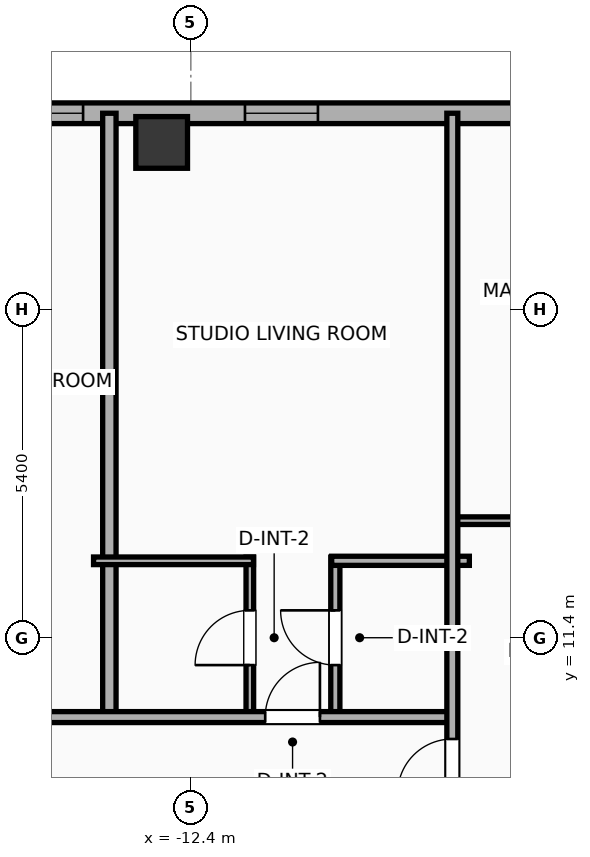
"""IFC4 building model, lengths in metres.
Left out: names, types, materials, properties, quantities, classifications, styles, units other than length and angle.
Written with IfcOpenShell. Run it as: python <this file> out.ifc"""

import sys

from ifc_helpers import new_model, si_unit, direction, frame, frame_2d, origin, origin_2d, place, context, subcontext, project, spatial, rectangle, hollow_rectangle, extrude, element, fill, save


model = new_model("IFC4")
c1 = context("Model", 3, precision=1e-05, world=origin(), true_north=direction((0.0, 1.0)))
c2 = subcontext(c1, "Body", "Model", "MODEL_VIEW")
j1 = project(units=[si_unit("LENGTHUNIT", "METRE"), si_unit("PLANEANGLEUNIT", "RADIAN")], contexts=[c1])
p1 = place(None, origin())
s1 = spatial("IfcSite", under=j1, at=p1, CompositionType="ELEMENT")
p2 = place(p1, origin())
s2 = spatial("IfcBuilding", under=s1, at=p2, CompositionType="ELEMENT")
p3 = place(p2, frame((0.0, 0.0, 200.2)))
s3 = spatial("IfcBuildingStorey", under=s2, at=p3, CompositionType="ELEMENT", Elevation=200.2)
p4 = place(p3, frame((-12.88, 19.55, 0.0), z_axis=(0.0, 0.0, 1.0), x_axis=(1.0, 0.0, 0.0)))
e1 = element("IfcColumn", 1, at=p4, inside=s3, PredefinedType="COLUMN", context=c2, shape_type="SweptSolid", body=[
    extrude(hollow_rectangle(XDim=0.85, YDim=0.85, WallThickness=0.028, at=origin_2d()), origin(), (0.0, 0.0, 1.0), 3.9),
])
p5 = place(p3, frame((-22.783, 20.03, 0.0), z_axis=(0.0, 0.0, 1.0), x_axis=(1.0, 0.0, 0.0)))
e2 = element("IfcWall", 2, at=p5, inside=s3, PredefinedType="ELEMENTEDWALL", context=c2, shape_type="SweptSolid", body=[
    extrude(rectangle(XDim=49.566, YDim=0.34, at=frame_2d((24.783, 0.0))), origin(), (0.0, 0.0, 1.0), 2.54),
])
p6 = place(p5, frame((6.211, 0.0, 0.75)))
e3 = element("IfcOpeningElement", 3, at=p6, cuts=e2, PredefinedType="OPENING", context=c2, shape_type="SweptSolid", body=[
    extrude(rectangle(XDim=2.4, YDim=1.63, at=frame_2d((1.2, 0.815))), frame((0.0, 0.18, 0.0), z_axis=(0.0, -1.0, 0.0), x_axis=(1.0, 0.0, 0.0)), (0.0, 0.0, 1.0), 0.36),
])
p7 = place(p5, frame((23.583, 0.0, 0.75)))
e4 = element("IfcOpeningElement", 4, at=p7, cuts=e2, PredefinedType="OPENING", context=c2, shape_type="SweptSolid", body=[
    extrude(rectangle(XDim=2.4, YDim=1.63, at=frame_2d((1.2, 0.815))), frame((0.0, 0.18, 0.0), z_axis=(0.0, -1.0, 0.0), x_axis=(1.0, 0.0, 0.0)), (0.0, 0.0, 1.0), 0.36),
])
p8 = place(p5, frame((3.893, 0.0, 0.75)))
e5 = element("IfcOpeningElement", 5, at=p8, cuts=e2, PredefinedType="OPENING", context=c2, shape_type="SweptSolid", body=[
    extrude(rectangle(XDim=1.2, YDim=1.63, at=frame_2d((0.6, 0.815))), frame((0.0, 0.18, 0.0), z_axis=(0.0, -1.0, 0.0), x_axis=(1.0, 0.0, 0.0)), (0.0, 0.0, 1.0), 0.36),
])
p9 = place(p5, frame((11.273, 0.0, 0.75)))
e6 = element("IfcOpeningElement", 6, at=p9, cuts=e2, PredefinedType="OPENING", context=c2, shape_type="SweptSolid", body=[
    extrude(rectangle(XDim=1.2, YDim=1.63, at=frame_2d((0.6, 0.815))), frame((0.0, 0.18, 0.0), z_axis=(0.0, -1.0, 0.0), x_axis=(1.0, 0.0, 0.0)), (0.0, 0.0, 1.0), 0.36),
])
p10 = place(p5, frame((31.889, 0.0, 0.75)))
e7 = element("IfcOpeningElement", 7, at=p10, cuts=e2, PredefinedType="OPENING", context=c2, shape_type="SweptSolid", body=[
    extrude(rectangle(XDim=1.2, YDim=1.63, at=frame_2d((0.6, 0.815))), frame((0.0, 0.18, 0.0), z_axis=(0.0, -1.0, 0.0), x_axis=(1.0, 0.0, 0.0)), (0.0, 0.0, 1.0), 0.36),
])
p11 = place(p5, frame((34.719, 0.0, 0.75)))
e8 = element("IfcOpeningElement", 8, at=p11, cuts=e2, PredefinedType="OPENING", context=c2, shape_type="SweptSolid", body=[
    extrude(rectangle(XDim=1.2, YDim=1.63, at=frame_2d((0.6, 0.815))), frame((0.0, 0.18, 0.0), z_axis=(0.0, -1.0, 0.0), x_axis=(1.0, 0.0, 0.0)), (0.0, 0.0, 1.0), 0.36),
])
p12 = place(p5, frame((37.823, 0.0, 0.75)))
e9 = element("IfcOpeningElement", 9, at=p12, cuts=e2, PredefinedType="OPENING", context=c2, shape_type="SweptSolid", body=[
    extrude(rectangle(XDim=1.2, YDim=1.63, at=frame_2d((0.6, 0.815))), frame((0.0, 0.18, 0.0), z_axis=(0.0, -1.0, 0.0), x_axis=(1.0, 0.0, 0.0)), (0.0, 0.0, 1.0), 0.36),
])
p13 = place(p5, frame((16.113, 0.0, 0.75)))
e10 = element("IfcOpeningElement", 10, at=p13, cuts=e2, PredefinedType="OPENING", context=c2, shape_type="SweptSolid", body=[
    extrude(rectangle(XDim=1.2, YDim=1.63, at=frame_2d((0.6, 0.815))), frame((0.0, 0.18, 0.0), z_axis=(0.0, -1.0, 0.0), x_axis=(1.0, 0.0, 0.0)), (0.0, 0.0, 1.0), 0.36),
])
p14 = place(p5, frame((20.513, 0.0, 0.75)))
e11 = element("IfcOpeningElement", 11, at=p14, cuts=e2, PredefinedType="OPENING", context=c2, shape_type="SweptSolid", body=[
    extrude(rectangle(XDim=1.2, YDim=1.63, at=frame_2d((0.6, 0.815))), frame((0.0, 0.18, 0.0), z_axis=(0.0, -1.0, 0.0), x_axis=(1.0, 0.0, 0.0)), (0.0, 0.0, 1.0), 0.36),
])
p15 = place(p5, frame((27.893, 0.0, 0.75)))
e12 = element("IfcOpeningElement", 12, at=p15, cuts=e2, PredefinedType="OPENING", context=c2, shape_type="SweptSolid", body=[
    extrude(rectangle(XDim=1.2, YDim=1.63, at=frame_2d((0.6, 0.815))), frame((0.0, 0.18, 0.0), z_axis=(0.0, -1.0, 0.0), x_axis=(1.0, 0.0, 0.0)), (0.0, 0.0, 1.0), 0.36),
])
p16 = place(p5, frame((45.393, 0.0, 0.75)))
e13 = element("IfcOpeningElement", 13, at=p16, cuts=e2, PredefinedType="OPENING", context=c2, shape_type="SweptSolid", body=[
    extrude(rectangle(XDim=1.2, YDim=1.63, at=frame_2d((0.6, 0.815))), frame((0.0, 0.18, 0.0), z_axis=(0.0, -1.0, 0.0), x_axis=(1.0, 0.0, 0.0)), (0.0, 0.0, 1.0), 0.36),
])
p17 = place(p5, frame((47.28, 0.0, 0.75)))
e14 = element("IfcOpeningElement", 14, at=p17, cuts=e2, PredefinedType="OPENING", context=c2, shape_type="SweptSolid", body=[
    extrude(rectangle(XDim=1.2, YDim=1.63, at=frame_2d((0.6, 0.815))), frame((0.0, 0.18, 0.0), z_axis=(0.0, -1.0, 0.0), x_axis=(1.0, 0.0, 0.0)), (0.0, 0.0, 1.0), 0.36),
])
p18 = place(p3, frame((-13.74, 10.02, 0.0), z_axis=(0.0, 0.0, 1.0), x_axis=(0.0, 1.0, 0.0)))
e15 = element("IfcWall", 15, at=p18, inside=s3, PredefinedType="PARTITIONING", context=c2, shape_type="SweptSolid", body=[
    extrude(rectangle(XDim=10.01, YDim=0.22, at=frame_2d((5.005, 0.0))), origin(), (0.0, 0.0, 1.0), 3.65),
])
p19 = place(p3, frame((-11.43, 10.08, 0.0), z_axis=(0.0, 0.0, 1.0), x_axis=(0.0, 1.0, 0.0)))
e16 = element("IfcWall", 16, at=p19, inside=s3, PredefinedType="PARTITIONING", context=c2, shape_type="SweptSolid", body=[
    extrude(rectangle(XDim=2.65, YDim=0.125, at=frame_2d((1.325, 0.0))), origin(), (0.0, 0.0, 1.0), 3.65),
])
p20 = place(p19, frame((0.875, 0.0, 0.0)))
e17 = element("IfcOpeningElement", 17, at=p20, cuts=e16, PredefinedType="OPENING", context=c2, shape_type="SweptSolid", body=[
    extrude(rectangle(XDim=0.9, YDim=2.05, at=frame_2d((0.45, 1.025))), frame((0.0, 0.073, 0.0), z_axis=(0.0, -1.0, 0.0), x_axis=(1.0, 0.0, 0.0)), (0.0, 0.0, 1.0), 0.145),
])
p21 = place(p3, frame((-10.024, 10.08, 0.0), z_axis=(0.0, 0.0, 1.0), x_axis=(0.0, 1.0, 0.0)))
e18 = element("IfcWall", 18, at=p21, inside=s3, PredefinedType="PLUMBINGWALL", context=c2, shape_type="SweptSolid", body=[
    extrude(rectangle(XDim=2.65, YDim=0.15, at=frame_2d((1.325, 0.0))), origin(), (0.0, 0.0, 1.0), 3.65),
])
p22 = place(p21, frame((0.875, 0.0, 0.0)))
e19 = element("IfcOpeningElement", 19, at=p22, cuts=e18, PredefinedType="OPENING", context=c2, shape_type="SweptSolid", body=[
    extrude(rectangle(XDim=0.9, YDim=2.05, at=frame_2d((0.45, 1.025))), frame((0.0, 0.085, 0.0), z_axis=(0.0, -1.0, 0.0), x_axis=(1.0, 0.0, 0.0)), (0.0, 0.0, 1.0), 0.17),
])
p23 = place(p3, frame((-14.0, 12.67, 0.0), z_axis=(0.0, 0.0, 1.0), x_axis=(1.0, 0.0, 0.0)))
e20 = element("IfcWall", 20, at=p23, inside=s3, PredefinedType="PARTITIONING", context=c2, shape_type="SweptSolid", body=[
    extrude(rectangle(XDim=2.63, YDim=0.125, at=frame_2d((1.315, 0.0))), origin(), (0.0, 0.0, 1.0), 3.65),
])
p24 = place(p3, frame((-10.084, 12.67, 0.0), z_axis=(0.0, 0.0, 1.0), x_axis=(1.0, 0.0, 0.0)))
e21 = element("IfcWall", 21, at=p24, inside=s3, PredefinedType="PLUMBINGWALL", context=c2, shape_type="SweptSolid", body=[
    extrude(rectangle(XDim=2.264, YDim=0.15, at=frame_2d((1.132, 0.0))), origin(), (0.0, 0.0, 1.0), 3.65),
])
p25 = place(p3, frame((-19.5, 10.1, 0.0), z_axis=(0.0, 0.0, 1.0), x_axis=(1.0, 0.0, 0.0)))
e22 = element("IfcWall", 22, at=p25, inside=s3, PredefinedType="PARTITIONING", context=c2, shape_type="SweptSolid", body=[
    extrude(rectangle(XDim=11.42, YDim=0.18, at=frame_2d((5.71, 0.0))), origin(), (0.0, 0.0, 1.0), 3.65),
])
p26 = place(p25, frame((3.464, 0.0, 0.0)))
e23 = element("IfcOpeningElement", 23, at=p26, cuts=e22, PredefinedType="OPENING", context=c2, shape_type="SweptSolid", body=[
    extrude(rectangle(XDim=1.15, YDim=2.05, at=frame_2d((0.575, 1.025))), frame((0.0, 0.1, 0.0), z_axis=(0.0, -1.0, 0.0), x_axis=(1.0, 0.0, 0.0)), (0.0, 0.0, 1.0), 0.2),
])
p27 = place(p25, frame((8.323, 0.0, 0.0)))
e24 = element("IfcOpeningElement", 24, at=p27, cuts=e22, PredefinedType="OPENING", context=c2, shape_type="SweptSolid", body=[
    extrude(rectangle(XDim=0.9, YDim=2.05, at=frame_2d((0.45, 1.025))), frame((0.0, 0.1, 0.0), z_axis=(0.0, -1.0, 0.0), x_axis=(1.0, 0.0, 0.0)), (0.0, 0.0, 1.0), 0.2),
])
p28 = place(p3, frame((-8.08, 13.33, 0.0), z_axis=(0.0, 0.0, 1.0), x_axis=(1.0, 0.0, 0.0)))
e25 = element("IfcWall", 25, at=p28, inside=s3, PredefinedType="PARTITIONING", context=c2, shape_type="SweptSolid", body=[
    extrude(rectangle(XDim=8.06, YDim=0.125, at=frame_2d((4.03, 0.0))), origin(), (0.0, 0.0, 1.0), 3.65),
])
p29 = place(p28, frame((1.323, 0.0, 0.0)))
e26 = element("IfcOpeningElement", 26, at=p29, cuts=e25, PredefinedType="OPENING", context=c2, shape_type="SweptSolid", body=[
    extrude(rectangle(XDim=0.9, YDim=2.05, at=frame_2d((0.45, 1.025))), frame((0.0, 0.073, 0.0), z_axis=(0.0, -1.0, 0.0), x_axis=(1.0, 0.0, 0.0)), (0.0, 0.0, 1.0), 0.145),
])
p30 = place(p28, frame((4.547, 0.0, 0.0)))
e27 = element("IfcOpeningElement", 27, at=p30, cuts=e25, PredefinedType="OPENING", context=c2, shape_type="SweptSolid", body=[
    extrude(rectangle(XDim=0.9, YDim=2.05, at=frame_2d((0.45, 1.025))), frame((0.0, 0.073, 0.0), z_axis=(0.0, -1.0, 0.0), x_axis=(1.0, 0.0, 0.0)), (0.0, 0.0, 1.0), 0.145),
])
p31 = place(p3, frame((-8.1, 8.49, 0.0), z_axis=(0.0, 0.0, 1.0), x_axis=(0.0, 1.0, 0.0)))
e28 = element("IfcWall", 28, at=p31, inside=s3, PredefinedType="PARTITIONING", context=c2, shape_type="SweptSolid", body=[
    extrude(rectangle(XDim=11.54, YDim=0.18, at=frame_2d((5.77, 0.0))), origin(), (0.0, 0.0, 1.0), 3.65),
])
p32 = place(p31, frame((0.35, 0.0, 0.0)))
e29 = element("IfcOpeningElement", 29, at=p32, cuts=e28, PredefinedType="OPENING", context=c2, shape_type="SweptSolid", body=[
    extrude(rectangle(XDim=0.9, YDim=2.05, at=frame_2d((0.45, 1.025))), frame((0.0, 0.1, 0.0), z_axis=(0.0, -1.0, 0.0), x_axis=(1.0, 0.0, 0.0)), (0.0, 0.0, 1.0), 0.2),
])
p33 = place(p6, origin())
e30 = element("IfcWindow", 30, at=p33, inside=s3, PartitioningType="SINGLE_PANEL", PredefinedType="WINDOW", context=c2, shape_type="SweptSolid", body=[
    extrude(rectangle(XDim=2.4, YDim=1.63, at=frame_2d((1.2, 0.815))), frame((0.0, 0.03, 0.0), z_axis=(0.0, -1.0, 0.0), x_axis=(1.0, 0.0, 0.0)), (0.0, 0.0, 1.0), 0.06),
])
fill(e3, e30)
p34 = place(p9, origin())
e31 = element("IfcWindow", 31, at=p34, inside=s3, PartitioningType="SINGLE_PANEL", PredefinedType="WINDOW", context=c2, shape_type="SweptSolid", body=[
    extrude(rectangle(XDim=1.2, YDim=1.63, at=frame_2d((0.6, 0.815))), frame((0.0, 0.03, 0.0), z_axis=(0.0, -1.0, 0.0), x_axis=(1.0, 0.0, 0.0)), (0.0, 0.0, 1.0), 0.06),
])
fill(e6, e31)
p35 = place(p20, origin())
e32 = element("IfcDoor", 32, at=p35, inside=s3, OperationType="SINGLE_SWING_LEFT", PredefinedType="DOOR", context=c2, shape_type="SweptSolid", body=[
    extrude(rectangle(XDim=0.9, YDim=2.05, at=frame_2d((0.45, 1.025))), frame((0.0, 0.025, 0.0), z_axis=(0.0, -1.0, 0.0), x_axis=(1.0, 0.0, 0.0)), (0.0, 0.0, 1.0), 0.05),
])
fill(e17, e32)
p36 = place(p22, origin())
e33 = element("IfcDoor", 33, at=p36, inside=s3, OperationType="SINGLE_SWING_RIGHT", PredefinedType="DOOR", context=c2, shape_type="SweptSolid", body=[
    extrude(rectangle(XDim=0.9, YDim=2.05, at=frame_2d((0.45, 1.025))), frame((0.0, 0.025, 0.0), z_axis=(0.0, -1.0, 0.0), x_axis=(1.0, 0.0, 0.0)), (0.0, 0.0, 1.0), 0.05),
])
fill(e19, e33)
p37 = place(p27, origin())
e34 = element("IfcDoor", 34, at=p37, inside=s3, OperationType="SINGLE_SWING_RIGHT", PredefinedType="DOOR", context=c2, shape_type="SweptSolid", body=[
    extrude(rectangle(XDim=0.9, YDim=2.05, at=frame_2d((0.45, 1.025))), frame((0.0, 0.025, 0.0), z_axis=(0.0, -1.0, 0.0), x_axis=(1.0, 0.0, 0.0)), (0.0, 0.0, 1.0), 0.05),
])
fill(e24, e34)
p38 = place(p32, origin())
e35 = element("IfcDoor", 35, at=p38, inside=s3, OperationType="SINGLE_SWING_LEFT", PredefinedType="DOOR", context=c2, shape_type="SweptSolid", body=[
    extrude(rectangle(XDim=0.9, YDim=2.05, at=frame_2d((0.45, 1.025))), frame((0.0, 0.025, 0.0), z_axis=(0.0, -1.0, 0.0), x_axis=(1.0, 0.0, 0.0)), (0.0, 0.0, 1.0), 0.05),
])
fill(e29, e35)
save(model, sys.argv[1])
